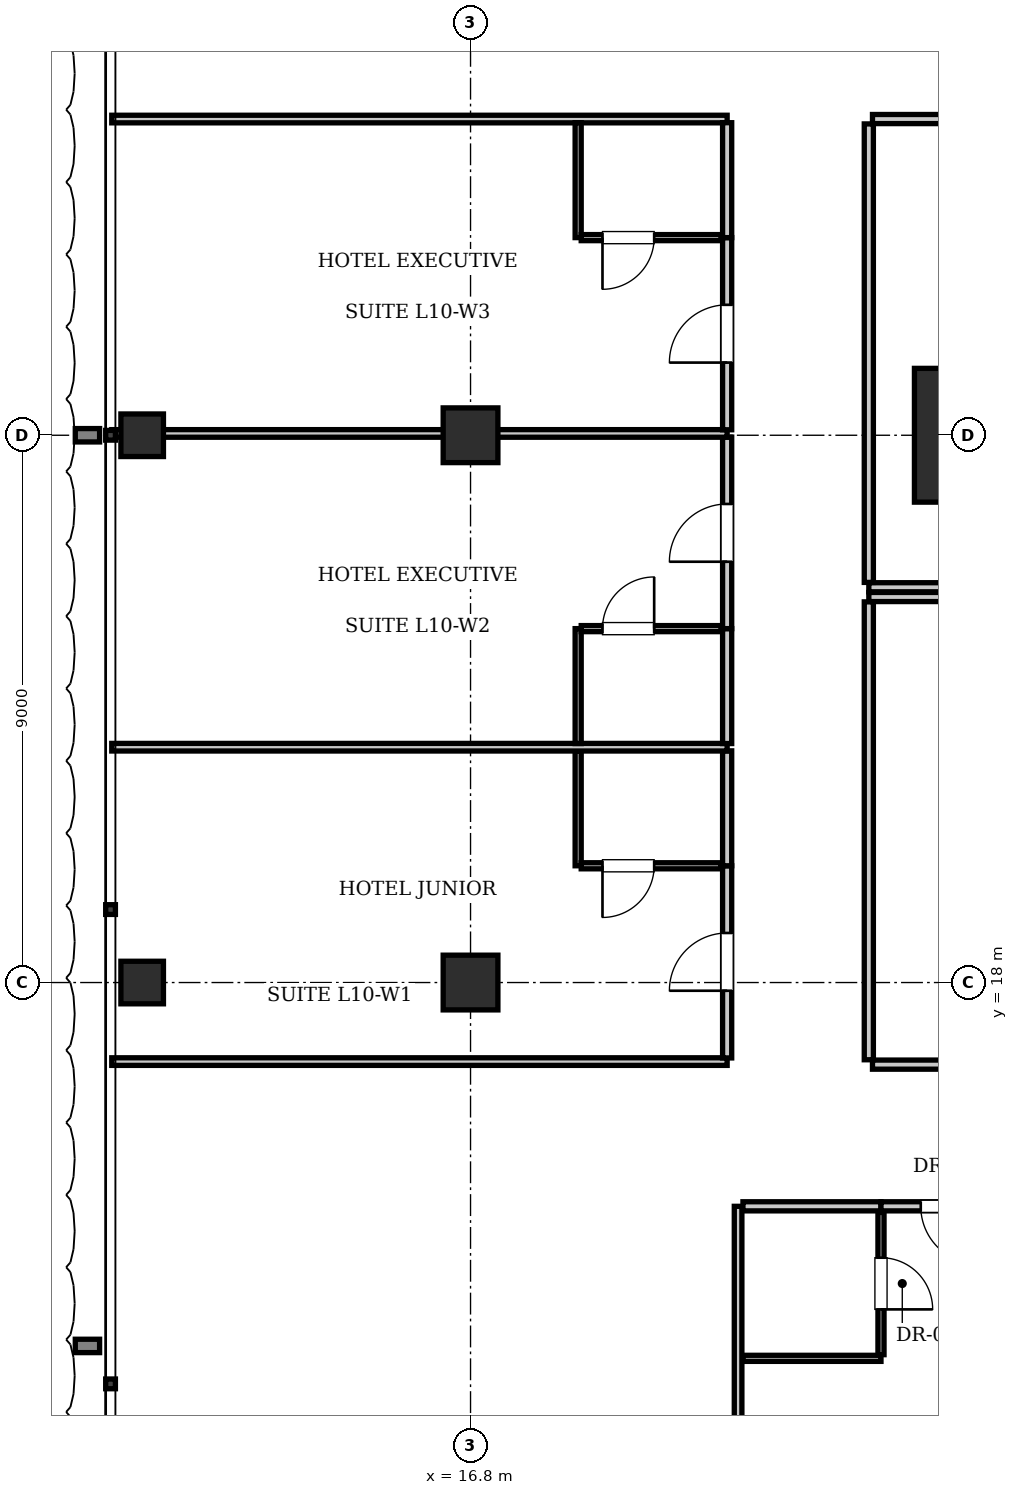
"""IFC4 building model, lengths in metres.
Left out: names, types, materials, properties, quantities, classifications, styles, units other than length and angle.
Written with IfcOpenShell. Run it as: python <this file> out.ifc"""

import sys

from ifc_helpers import new_model, si_unit, direction, frame, frame_2d, origin, origin_2d, place, context, subcontext, project, spatial, rectangle, i_section, extrude, element, fill, save


model = new_model("IFC4")
c1 = context("Model", 3, precision=1e-05, world=origin(), true_north=direction((0.0, 1.0)))
c2 = subcontext(c1, "Body", "Model", "MODEL_VIEW")
j1 = project(units=[si_unit("LENGTHUNIT", "METRE"), si_unit("PLANEANGLEUNIT", "RADIAN")], contexts=[c1])
p1 = place(None, origin())
s1 = spatial("IfcSite", under=j1, at=p1, CompositionType="ELEMENT")
p2 = place(p1, origin())
s2 = spatial("IfcBuilding", under=s1, at=p2, CompositionType="ELEMENT")
p3 = place(p2, frame((0.0, 0.0, 46.2)))
s3 = spatial("IfcBuildingStorey", under=s2, at=p3, CompositionType="ELEMENT", Elevation=46.2)
p4 = place(p3, frame((25.2, 27.0, 0.0), z_axis=(0.0, 0.0, 1.0), x_axis=(1.0, 0.0, 0.0)))
e1 = element("IfcColumn", 1, at=p4, inside=s3, PredefinedType="COLUMN", context=c2, shape_type="SweptSolid", body=[
    extrude(rectangle(XDim=2.2, YDim=2.2, at=origin_2d()), origin(), (0.0, 0.0, 1.0), 3.85),
])
for number, where, z_axis, x_axis in (
    (2, (16.8, 18.0, 0.0), (0.0, 0.0, 1.0), (1.0, 0.0, 0.0)),
    (3, (16.8, 27.0, 0.0), (0.0, 0.0, 1.0), (1.0, 0.0, 0.0)),
):
    element("IfcColumn", number, at=place(p3, frame(where, z_axis=z_axis, x_axis=x_axis)), inside=s3, PredefinedType="COLUMN", context=c2, shape_type="SweptSolid", body=[
        extrude(rectangle(XDim=0.9, YDim=0.9, at=origin_2d()), origin(), (0.0, 0.0, 1.0), 3.85),
    ])
for number, where, z_axis, x_axis in (
    (4, (11.4, 18.0, 0.0), (0.0, 0.0, 1.0), (1.0, 0.0, 0.0)),
    (5, (11.4, 27.0, 0.0), (0.0, 0.0, 1.0), (1.0, 0.0, 0.0)),
):
    element("IfcColumn", number, at=place(p3, frame(where, z_axis=z_axis, x_axis=x_axis)), inside=s3, PredefinedType="COLUMN", context=c2, shape_type="SweptSolid", body=[
        extrude(i_section(OverallWidth=0.7, OverallDepth=0.7, WebThickness=0.028, FlangeThickness=0.044, at=origin_2d()), origin(), (0.0, 0.0, 1.0), 3.85),
    ])
p5 = place(p3, frame((23.35, 24.5, 0.0), z_axis=(0.0, 0.0, 1.0), x_axis=(1.0, 0.0, 0.0)))
e6 = element("IfcWall", 6, at=p5, inside=s3, PredefinedType="PARTITIONING", context=c2, shape_type="SweptSolid", body=[
    extrude(rectangle(XDim=28.9, YDim=0.15, at=frame_2d((14.45, 0.0))), origin(), (0.0, 0.0, 1.0), 3.61),
])
p6 = place(p3, frame((23.35, 24.58, 0.0), z_axis=(0.0, 0.0, 1.0), x_axis=(0.0, 1.0, 0.0)))
e7 = element("IfcWall", 7, at=p6, inside=s3, PredefinedType="PARTITIONING", context=c2, shape_type="SweptSolid", body=[
    extrude(rectangle(XDim=7.54, YDim=0.15, at=frame_2d((3.77, 0.0))), origin(), (0.0, 0.0, 1.0), 3.61),
])
p7 = place(p3, frame((23.41, 32.2, 0.0), z_axis=(0.0, 0.0, 1.0), x_axis=(1.0, 0.0, 0.0)))
e8 = element("IfcWall", 8, at=p7, inside=s3, PredefinedType="PARTITIONING", context=c2, shape_type="SweptSolid", body=[
    extrude(rectangle(XDim=6.557, YDim=0.15, at=frame_2d((3.279, 0.0))), origin(), (0.0, 0.0, 1.0), 3.61),
])
p8 = place(p7, frame((2.829, 0.0, 0.0)))
e9 = element("IfcOpeningElement", 9, at=p8, cuts=e8, PredefinedType="OPENING", context=c2, shape_type="SweptSolid", body=[
    extrude(rectangle(XDim=0.9, YDim=2.1, at=frame_2d((0.45, 1.05))), frame((0.0, 0.085, 0.0), z_axis=(0.0, -1.0, 0.0), x_axis=(1.0, 0.0, 0.0)), (0.0, 0.0, 1.0), 0.17),
])
p9 = place(p3, frame((23.35, 24.34, 0.0), z_axis=(0.0, 0.0, 1.0), x_axis=(1.0, 0.0, 0.0)))
e10 = element("IfcWall", 10, at=p9, inside=s3, PredefinedType="PARTITIONING", context=c2, shape_type="SweptSolid", body=[
    extrude(rectangle(XDim=28.9, YDim=0.15, at=frame_2d((14.45, 0.0))), origin(), (0.0, 0.0, 1.0), 3.61),
])
p10 = place(p3, frame((23.35, 16.73, 0.0), z_axis=(0.0, 0.0, 1.0), x_axis=(0.0, 1.0, 0.0)))
e11 = element("IfcWall", 11, at=p10, inside=s3, PredefinedType="PARTITIONING", context=c2, shape_type="SweptSolid", body=[
    extrude(rectangle(XDim=7.53, YDim=0.15, at=frame_2d((3.765, 0.0))), origin(), (0.0, 0.0, 1.0), 3.61),
])
p11 = place(p3, frame((23.41, 16.65, 0.0), z_axis=(0.0, 0.0, 1.0), x_axis=(1.0, 0.0, 0.0)))
e12 = element("IfcWall", 12, at=p11, inside=s3, PredefinedType="PARTITIONING", context=c2, shape_type="SweptSolid", body=[
    extrude(rectangle(XDim=10.603, YDim=0.15, at=frame_2d((5.302, 0.0))), origin(), (0.0, 0.0, 1.0), 3.61),
])
p12 = place(p11, frame((4.852, 0.0, 0.0)))
e13 = element("IfcOpeningElement", 13, at=p12, cuts=e12, PredefinedType="OPENING", context=c2, shape_type="SweptSolid", body=[
    extrude(rectangle(XDim=0.9, YDim=2.1, at=frame_2d((0.45, 1.05))), frame((0.0, 0.085, 0.0), z_axis=(0.0, -1.0, 0.0), x_axis=(1.0, 0.0, 0.0)), (0.0, 0.0, 1.0), 0.17),
])
p13 = place(p3, frame((21.2, 0.1, 0.0), z_axis=(0.0, 0.0, 1.0), x_axis=(0.0, 1.0, 0.0)))
e14 = element("IfcWall", 14, at=p13, inside=s3, PredefinedType="PARTITIONING", context=c2, shape_type="SweptSolid", body=[
    extrude(rectangle(XDim=14.22, YDim=0.125, at=frame_2d((7.11, 0.0))), origin(), (0.0, 0.0, 1.0), 3.61),
])
p14 = place(p3, frame((21.28, 14.32, 0.0), z_axis=(0.0, 0.0, 1.0), x_axis=(1.0, 0.0, 0.0)))
e15 = element("IfcWall", 15, at=p14, inside=s3, PredefinedType="PARTITIONING", context=c2, shape_type="SweptSolid", body=[
    extrude(rectangle(XDim=2.27, YDim=0.15, at=frame_2d((1.135, 0.0))), origin(), (0.0, 0.0, 1.0), 3.61),
])
p15 = place(p3, frame((21.28, 11.82, 0.0), z_axis=(0.0, 0.0, 1.0), x_axis=(1.0, 0.0, 0.0)))
e16 = element("IfcWall", 16, at=p15, inside=s3, PredefinedType="PARTITIONING", context=c2, shape_type="SweptSolid", body=[
    extrude(rectangle(XDim=2.27, YDim=0.1, at=frame_2d((1.135, 0.0))), origin(), (0.0, 0.0, 1.0), 3.61),
])
p16 = place(p3, frame((23.55, 11.88, 0.0), z_axis=(0.0, 0.0, 1.0), x_axis=(0.0, 1.0, 0.0)))
e17 = element("IfcWall", 17, at=p16, inside=s3, PredefinedType="PARTITIONING", context=c2, shape_type="SweptSolid", body=[
    extrude(rectangle(XDim=2.34, YDim=0.1, at=frame_2d((1.17, 0.0))), origin(), (0.0, 0.0, 1.0), 3.61),
])
p17 = place(p16, frame((0.745, 0.0, 0.0)))
e18 = element("IfcOpeningElement", 18, at=p17, cuts=e17, PredefinedType="OPENING", context=c2, shape_type="SweptSolid", body=[
    extrude(rectangle(XDim=0.85, YDim=2.1, at=frame_2d((0.425, 1.05))), frame((0.0, 0.06, 0.0), z_axis=(0.0, -1.0, 0.0), x_axis=(1.0, 0.0, 0.0)), (0.0, 0.0, 1.0), 0.12),
])
p18 = place(p3, frame((23.55, 14.32, 0.0), z_axis=(0.0, 0.0, 1.0), x_axis=(1.0, 0.0, 0.0)))
e19 = element("IfcWall", 19, at=p18, inside=s3, PredefinedType="PARTITIONING", context=c2, shape_type="SweptSolid", body=[
    extrude(rectangle(XDim=2.258, YDim=0.15, at=frame_2d((1.129, 0.0))), origin(), (0.0, 0.0, 1.0), 3.61),
])
p19 = place(p18, frame((0.654, 0.0, 0.0)))
e20 = element("IfcOpeningElement", 20, at=p19, cuts=e19, PredefinedType="OPENING", context=c2, shape_type="SweptSolid", body=[
    extrude(rectangle(XDim=0.95, YDim=2.15, at=frame_2d((0.475, 1.075))), frame((0.0, 0.085, 0.0), z_axis=(0.0, -1.0, 0.0), x_axis=(1.0, 0.0, 0.0)), (0.0, 0.0, 1.0), 0.17),
])
for number, where, z_axis, x_axis in (
    (21, (10.9, 16.7, 0.0), (0.0, 0.0, 1.0), (1.0, 0.0, 0.0)),
    (22, (10.9, 32.2, 0.0), (0.0, 0.0, 1.0), (1.0, 0.0, 0.0)),
):
    element("IfcWall", number, at=place(p3, frame(where, z_axis=z_axis, x_axis=x_axis)), inside=s3, PredefinedType="PARTITIONING", context=c2, shape_type="SweptSolid", body=[
        extrude(rectangle(XDim=10.12, YDim=0.125, at=frame_2d((5.06, 0.0))), origin(), (0.0, 0.0, 1.0), 3.61),
    ])
p20 = place(p3, frame((21.02, 16.76, 0.0), z_axis=(0.0, 0.0, 1.0), x_axis=(0.0, 1.0, 0.0)))
e23 = element("IfcWall", 23, at=p20, inside=s3, PredefinedType="PARTITIONING", context=c2, shape_type="SweptSolid", body=[
    extrude(rectangle(XDim=3.16, YDim=0.15, at=frame_2d((1.58, 0.0))), origin(), (0.0, 0.0, 1.0), 3.352),
])
p21 = place(p20, frame((1.105, 0.0, 0.0)))
e24 = element("IfcOpeningElement", 24, at=p21, cuts=e23, PredefinedType="OPENING", context=c2, shape_type="SweptSolid", body=[
    extrude(rectangle(XDim=0.95, YDim=2.15, at=frame_2d((0.475, 1.075))), frame((0.0, 0.085, 0.0), z_axis=(0.0, -1.0, 0.0), x_axis=(1.0, 0.0, 0.0)), (0.0, 0.0, 1.0), 0.17),
])
p22 = place(p3, frame((21.02, 19.92, 0.0), z_axis=(0.0, 0.0, 1.0), x_axis=(0.0, 1.0, 0.0)))
e25 = element("IfcWall", 25, at=p22, inside=s3, PredefinedType="PARTITIONING", context=c2, shape_type="SweptSolid", body=[
    extrude(rectangle(XDim=1.89, YDim=0.15, at=frame_2d((0.945, 0.0))), origin(), (0.0, 0.0, 1.0), 3.403),
])
p23 = place(p3, frame((18.57, 19.92, 0.0), z_axis=(0.0, 0.0, 1.0), x_axis=(0.0, 1.0, 0.0)))
e26 = element("IfcWall", 26, at=p23, inside=s3, PredefinedType="PARTITIONING", context=c2, shape_type="SweptSolid", body=[
    extrude(rectangle(XDim=1.89, YDim=0.1, at=frame_2d((0.945, 0.0))), origin(), (0.0, 0.0, 1.0), 3.61),
])
p24 = place(p3, frame((18.62, 19.92, 0.0), z_axis=(0.0, 0.0, 1.0), x_axis=(1.0, 0.0, 0.0)))
e27 = element("IfcWall", 27, at=p24, inside=s3, PredefinedType="PARTITIONING", context=c2, shape_type="SweptSolid", body=[
    extrude(rectangle(XDim=2.3, YDim=0.1, at=frame_2d((1.15, 0.0))), origin(), (0.0, 0.0, 1.0), 3.61),
])
p25 = place(p24, frame((0.35, 0.0, 0.0)))
e28 = element("IfcOpeningElement", 28, at=p25, cuts=e27, PredefinedType="OPENING", context=c2, shape_type="SweptSolid", body=[
    extrude(rectangle(XDim=0.85, YDim=2.1, at=frame_2d((0.425, 1.05))), frame((0.0, 0.06, 0.0), z_axis=(0.0, -1.0, 0.0), x_axis=(1.0, 0.0, 0.0)), (0.0, 0.0, 1.0), 0.12),
])
p26 = place(p3, frame((10.9, 21.87, 0.0), z_axis=(0.0, 0.0, 1.0), x_axis=(1.0, 0.0, 0.0)))
e29 = element("IfcWall", 29, at=p26, inside=s3, PredefinedType="PARTITIONING", context=c2, shape_type="SweptSolid", body=[
    extrude(rectangle(XDim=10.12, YDim=0.125, at=frame_2d((5.06, 0.0))), origin(), (0.0, 0.0, 1.0), 3.61),
])
p27 = place(p3, frame((21.02, 21.93, 0.0), z_axis=(0.0, 0.0, 1.0), x_axis=(0.0, 1.0, 0.0)))
e30 = element("IfcWall", 30, at=p27, inside=s3, PredefinedType="PARTITIONING", context=c2, shape_type="SweptSolid", body=[
    extrude(rectangle(XDim=1.89, YDim=0.15, at=frame_2d((0.945, 0.0))), origin(), (0.0, 0.0, 1.0), 3.403),
])
p28 = place(p3, frame((21.02, 23.82, 0.0), z_axis=(0.0, 0.0, 1.0), x_axis=(0.0, 1.0, 0.0)))
e31 = element("IfcWall", 31, at=p28, inside=s3, PredefinedType="PARTITIONING", context=c2, shape_type="SweptSolid", body=[
    extrude(rectangle(XDim=3.15, YDim=0.15, at=frame_2d((1.575, 0.0))), origin(), (0.0, 0.0, 1.0), 3.403),
])
p29 = place(p28, frame((1.1, 0.0, 0.0)))
e32 = element("IfcOpeningElement", 32, at=p29, cuts=e31, PredefinedType="OPENING", context=c2, shape_type="SweptSolid", body=[
    extrude(rectangle(XDim=0.95, YDim=2.15, at=frame_2d((0.475, 1.075))), frame((0.0, 0.085, 0.0), z_axis=(0.0, -1.0, 0.0), x_axis=(1.0, 0.0, 0.0)), (0.0, 0.0, 1.0), 0.17),
])
p30 = place(p3, frame((18.57, 21.93, 0.0), z_axis=(0.0, 0.0, 1.0), x_axis=(0.0, 1.0, 0.0)))
e33 = element("IfcWall", 33, at=p30, inside=s3, PredefinedType="PARTITIONING", context=c2, shape_type="SweptSolid", body=[
    extrude(rectangle(XDim=1.89, YDim=0.1, at=frame_2d((0.945, 0.0))), origin(), (0.0, 0.0, 1.0), 3.61),
])
p31 = place(p3, frame((18.62, 23.82, 0.0), z_axis=(0.0, 0.0, 1.0), x_axis=(1.0, 0.0, 0.0)))
e34 = element("IfcWall", 34, at=p31, inside=s3, PredefinedType="PARTITIONING", context=c2, shape_type="SweptSolid", body=[
    extrude(rectangle(XDim=2.3, YDim=0.1, at=frame_2d((1.15, 0.0))), origin(), (0.0, 0.0, 1.0), 3.61),
])
p32 = place(p31, frame((0.35, 0.0, 0.0)))
e35 = element("IfcOpeningElement", 35, at=p32, cuts=e34, PredefinedType="OPENING", context=c2, shape_type="SweptSolid", body=[
    extrude(rectangle(XDim=0.85, YDim=2.1, at=frame_2d((0.425, 1.05))), frame((0.0, 0.06, 0.0), z_axis=(0.0, -1.0, 0.0), x_axis=(1.0, 0.0, 0.0)), (0.0, 0.0, 1.0), 0.12),
])
p33 = place(p3, frame((10.9, 27.03, 0.0), z_axis=(0.0, 0.0, 1.0), x_axis=(1.0, 0.0, 0.0)))
e36 = element("IfcWall", 36, at=p33, inside=s3, PredefinedType="PARTITIONING", context=c2, shape_type="SweptSolid", body=[
    extrude(rectangle(XDim=10.12, YDim=0.125, at=frame_2d((5.06, 0.0))), origin(), (0.0, 0.0, 1.0), 2.988),
])
p34 = place(p3, frame((21.02, 27.09, 0.0), z_axis=(0.0, 0.0, 1.0), x_axis=(0.0, 1.0, 0.0)))
e37 = element("IfcWall", 37, at=p34, inside=s3, PredefinedType="PARTITIONING", context=c2, shape_type="SweptSolid", body=[
    extrude(rectangle(XDim=3.16, YDim=0.15, at=frame_2d((1.58, 0.0))), origin(), (0.0, 0.0, 1.0), 3.457),
])
p35 = place(p34, frame((1.105, 0.0, 0.0)))
e38 = element("IfcOpeningElement", 38, at=p35, cuts=e37, PredefinedType="OPENING", context=c2, shape_type="SweptSolid", body=[
    extrude(rectangle(XDim=0.95, YDim=2.15, at=frame_2d((0.475, 1.075))), frame((0.0, 0.085, 0.0), z_axis=(0.0, -1.0, 0.0), x_axis=(1.0, 0.0, 0.0)), (0.0, 0.0, 1.0), 0.17),
])
p36 = place(p3, frame((21.02, 30.25, 0.0), z_axis=(0.0, 0.0, 1.0), x_axis=(0.0, 1.0, 0.0)))
e39 = element("IfcWall", 39, at=p36, inside=s3, PredefinedType="PARTITIONING", context=c2, shape_type="SweptSolid", body=[
    extrude(rectangle(XDim=1.89, YDim=0.15, at=frame_2d((0.945, 0.0))), origin(), (0.0, 0.0, 1.0), 3.457),
])
p37 = place(p3, frame((18.57, 30.25, 0.0), z_axis=(0.0, 0.0, 1.0), x_axis=(0.0, 1.0, 0.0)))
e40 = element("IfcWall", 40, at=p37, inside=s3, PredefinedType="PARTITIONING", context=c2, shape_type="SweptSolid", body=[
    extrude(rectangle(XDim=1.89, YDim=0.1, at=frame_2d((0.945, 0.0))), origin(), (0.0, 0.0, 1.0), 3.61),
])
p38 = place(p3, frame((18.62, 30.25, 0.0), z_axis=(0.0, 0.0, 1.0), x_axis=(1.0, 0.0, 0.0)))
e41 = element("IfcWall", 41, at=p38, inside=s3, PredefinedType="PARTITIONING", context=c2, shape_type="SweptSolid", body=[
    extrude(rectangle(XDim=2.3, YDim=0.1, at=frame_2d((1.15, 0.0))), origin(), (0.0, 0.0, 1.0), 3.61),
])
p39 = place(p38, frame((0.35, 0.0, 0.0)))
e42 = element("IfcOpeningElement", 42, at=p39, cuts=e41, PredefinedType="OPENING", context=c2, shape_type="SweptSolid", body=[
    extrude(rectangle(XDim=0.85, YDim=2.1, at=frame_2d((0.425, 1.05))), frame((0.0, 0.06, 0.0), z_axis=(0.0, -1.0, 0.0), x_axis=(1.0, 0.0, 0.0)), (0.0, 0.0, 1.0), 0.12),
])
p40 = place(p17, frame((0.85, 0.0, 0.0), z_axis=(0.0, 0.0, 1.0), x_axis=(-1.0, 0.0, 0.0)))
e43 = element("IfcDoor", 43, at=p40, inside=s3, OperationType="SINGLE_SWING_RIGHT", PredefinedType="DOOR", context=c2, shape_type="SweptSolid", body=[
    extrude(rectangle(XDim=0.85, YDim=2.1, at=frame_2d((0.425, 1.05))), frame((0.0, 0.025, 0.0), z_axis=(0.0, -1.0, 0.0), x_axis=(1.0, 0.0, 0.0)), (0.0, 0.0, 1.0), 0.05),
])
fill(e18, e43)
p41 = place(p19, frame((0.95, 0.0, 0.0), z_axis=(0.0, 0.0, 1.0), x_axis=(-1.0, 0.0, 0.0)))
e44 = element("IfcDoor", 44, at=p41, inside=s3, OperationType="SINGLE_SWING_LEFT", PredefinedType="DOOR", context=c2, shape_type="SweptSolid", body=[
    extrude(rectangle(XDim=0.95, YDim=2.15, at=frame_2d((0.475, 1.075))), frame((0.0, 0.025, 0.0), z_axis=(0.0, -1.0, 0.0), x_axis=(1.0, 0.0, 0.0)), (0.0, 0.0, 1.0), 0.05),
])
fill(e20, e44)
p42 = place(p25, frame((0.85, 0.0, 0.0), z_axis=(0.0, 0.0, 1.0), x_axis=(-1.0, 0.0, 0.0)))
e45 = element("IfcDoor", 45, at=p42, inside=s3, OperationType="SINGLE_SWING_RIGHT", PredefinedType="DOOR", context=c2, shape_type="SweptSolid", body=[
    extrude(rectangle(XDim=0.85, YDim=2.1, at=frame_2d((0.425, 1.05))), frame((0.0, 0.025, 0.0), z_axis=(0.0, -1.0, 0.0), x_axis=(1.0, 0.0, 0.0)), (0.0, 0.0, 1.0), 0.05),
])
fill(e28, e45)
p43 = place(p21, origin())
e46 = element("IfcDoor", 46, at=p43, inside=s3, OperationType="SINGLE_SWING_LEFT", PredefinedType="DOOR", context=c2, shape_type="SweptSolid", body=[
    extrude(rectangle(XDim=0.95, YDim=2.15, at=frame_2d((0.475, 1.075))), frame((0.0, 0.025, 0.0), z_axis=(0.0, -1.0, 0.0), x_axis=(1.0, 0.0, 0.0)), (0.0, 0.0, 1.0), 0.05),
])
fill(e24, e46)
p44 = place(p32, origin())
e47 = element("IfcDoor", 47, at=p44, inside=s3, OperationType="SINGLE_SWING_RIGHT", PredefinedType="DOOR", context=c2, shape_type="SweptSolid", body=[
    extrude(rectangle(XDim=0.85, YDim=2.1, at=frame_2d((0.425, 1.05))), frame((0.0, 0.025, 0.0), z_axis=(0.0, -1.0, 0.0), x_axis=(1.0, 0.0, 0.0)), (0.0, 0.0, 1.0), 0.05),
])
fill(e35, e47)
p45 = place(p29, origin())
e48 = element("IfcDoor", 48, at=p45, inside=s3, OperationType="SINGLE_SWING_LEFT", PredefinedType="DOOR", context=c2, shape_type="SweptSolid", body=[
    extrude(rectangle(XDim=0.95, YDim=2.15, at=frame_2d((0.475, 1.075))), frame((0.0, 0.025, 0.0), z_axis=(0.0, -1.0, 0.0), x_axis=(1.0, 0.0, 0.0)), (0.0, 0.0, 1.0), 0.05),
])
fill(e32, e48)
p46 = place(p39, frame((0.85, 0.0, 0.0), z_axis=(0.0, 0.0, 1.0), x_axis=(-1.0, 0.0, 0.0)))
e49 = element("IfcDoor", 49, at=p46, inside=s3, OperationType="SINGLE_SWING_RIGHT", PredefinedType="DOOR", context=c2, shape_type="SweptSolid", body=[
    extrude(rectangle(XDim=0.85, YDim=2.1, at=frame_2d((0.425, 1.05))), frame((0.0, 0.025, 0.0), z_axis=(0.0, -1.0, 0.0), x_axis=(1.0, 0.0, 0.0)), (0.0, 0.0, 1.0), 0.05),
])
fill(e42, e49)
p47 = place(p35, origin())
e50 = element("IfcDoor", 50, at=p47, inside=s3, OperationType="SINGLE_SWING_LEFT", PredefinedType="DOOR", context=c2, shape_type="SweptSolid", body=[
    extrude(rectangle(XDim=0.95, YDim=2.15, at=frame_2d((0.475, 1.075))), frame((0.0, 0.025, 0.0), z_axis=(0.0, -1.0, 0.0), x_axis=(1.0, 0.0, 0.0)), (0.0, 0.0, 1.0), 0.05),
])
fill(e38, e50)
save(model, sys.argv[1])
